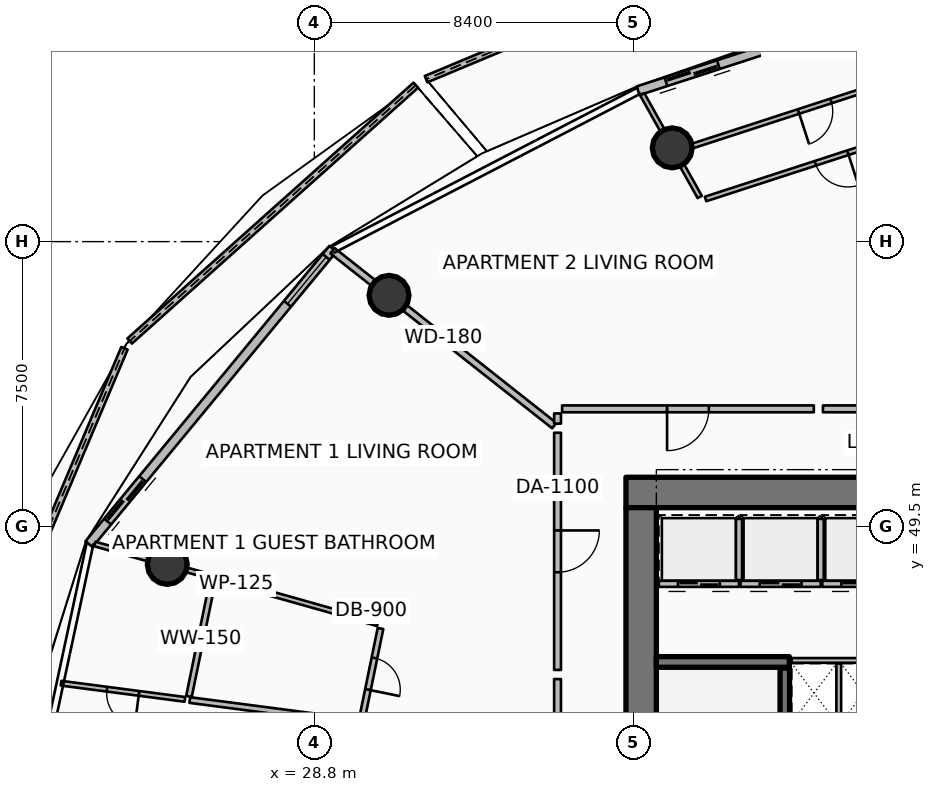
"""IFC4 building model, lengths in metres.
Left out: names, types, materials, properties, quantities, classifications, styles, units other than length and angle.
Written with IfcOpenShell. Run it as: python <this file> out.ifc"""

import sys

from ifc_helpers import new_model, si_unit, direction, frame, frame_2d, origin, origin_2d, place, context, subcontext, project, spatial, polyline, rectangle, circle, outline, extrude, element, fill, save


model = new_model("IFC4")
c1 = context("Model", 3, precision=1e-05, world=origin(), true_north=direction((0.0, 1.0)))
c2 = subcontext(c1, "Body", "Model", "MODEL_VIEW")
j1 = project(units=[si_unit("LENGTHUNIT", "METRE"), si_unit("PLANEANGLEUNIT", "RADIAN")], contexts=[c1])
p1 = place(None, origin())
s1 = spatial("IfcSite", under=j1, at=p1, CompositionType="ELEMENT")
p2 = place(p1, origin())
s2 = spatial("IfcBuilding", under=s1, at=p2, CompositionType="ELEMENT")
p3 = place(p2, frame((0.0, 0.0, 150.3)))
s3 = spatial("IfcBuildingStorey", under=s2, at=p3, CompositionType="ELEMENT", Elevation=150.3)
p4 = place(p3, frame((37.0, 50.4, 0.0), z_axis=(0.0, 0.0, 1.0), x_axis=(1.0, 0.0, 0.0)))
e1 = element("IfcWall", 1, at=p4, inside=s3, PredefinedType="SHEAR", context=c2, shape_type="SweptSolid", body=[
    extrude(rectangle(XDim=9.9, YDim=0.8, at=frame_2d((4.95, 0.0))), origin(), (0.0, 0.0, 1.0), 3.75),
])
p5 = place(p3, frame((37.4, 34.0, 0.0), z_axis=(0.0, 0.0, 1.0), x_axis=(0.0, 1.0, 0.0)))
e2 = element("IfcWall", 2, at=p5, inside=s3, PredefinedType="SHEAR", context=c2, shape_type="SweptSolid", body=[
    extrude(rectangle(XDim=16.0, YDim=0.8, at=frame_2d((8.0, 0.0))), origin(), (0.0, 0.0, 1.0), 3.75),
])
p6 = place(p3, frame((37.8, 45.94, 0.0), z_axis=(0.0, 0.0, 1.0), x_axis=(1.0, 0.0, 0.0)))
e3 = element("IfcWall", 3, at=p6, inside=s3, PredefinedType="SHEAR", context=c2, shape_type="SweptSolid", body=[
    extrude(rectangle(XDim=3.5, YDim=0.28, at=frame_2d((1.75, 0.0))), origin(), (0.0, 0.0, 1.0), 3.75),
])
for number, where, z_axis, x_axis in (
    (4, (38.218, 59.467, 0.0), (0.0, 0.0, 1.0), (1.0, 0.0, 0.0)),
    (5, (30.766, 55.586, 0.0), (0.0, 0.0, 1.0), (1.0, 0.0, 0.0)),
    (6, (24.93, 48.506, 0.0), (0.0, 0.0, 1.0), (1.0, 0.0, 0.0)),
):
    element("IfcColumn", number, at=place(p3, frame(where, z_axis=z_axis, x_axis=x_axis)), inside=s3, PredefinedType="COLUMN", context=c2, shape_type="SweptSolid", body=[
        extrude(circle(Radius=0.525, at=origin_2d()), origin(), (0.0, 0.0, 1.0), 3.5),
    ])
p7 = place(p3, frame((40.433, 64.901, 0.0), z_axis=(0.0, 0.0, 1.0), x_axis=(-0.922918869306, -0.384994494349, 0.0)))
e7 = element("IfcWall", 7, at=p7, inside=s3, PredefinedType="PARAPET", context=c2, shape_type="SweptSolid", body=[
    extrude(outline(polyline([(0.0, 0.0), (9.419, 0.0), (9.419, 1.756), (4.709, 1.853), (0.0, 1.832), (0.0, 0.0)])), frame((0.0, 0.09, 0.0), z_axis=(0.0, -1.0, 0.0), x_axis=(1.0, 0.0, 0.0)), (0.0, 0.0, 1.0), 0.18),
])
p8 = place(p3, frame((31.47, 61.116, 0.0), z_axis=(0.0, 0.0, 1.0), x_axis=(-0.745533944851, -0.666467656435, 0.0)))
e8 = element("IfcWall", 8, at=p8, inside=s3, PredefinedType="PARAPET", context=c2, shape_type="SweptSolid", body=[
    extrude(outline(polyline([(0.0, 0.0), (10.1, 0.0), (10.1, 1.348), (5.05, 1.562), (0.0, 1.747), (0.0, 0.0)])), frame((0.0, 0.09, 0.0), z_axis=(0.0, -1.0, 0.0), x_axis=(1.0, 0.0, 0.0)), (0.0, 0.0, 1.0), 0.18),
])
p9 = place(p3, frame((23.804, 54.194, 0.0), z_axis=(0.0, 0.0, 1.0), x_axis=(-0.388680391431, -0.921372646282, 0.0)))
e9 = element("IfcWall", 9, at=p9, inside=s3, PredefinedType="PARAPET", context=c2, shape_type="SweptSolid", body=[
    extrude(outline(polyline([(0.0, 0.0), (10.626, 0.0), (10.626, 1.12), (5.313, 1.182), (0.0, 1.348), (0.0, 0.0)])), frame((0.0, 0.09, 0.0), z_axis=(0.0, -1.0, 0.0), x_axis=(1.0, 0.0, 0.0)), (0.0, 0.0, 1.0), 0.18),
])
p10 = place(p3, frame((45.49, 63.624, 0.0), z_axis=(0.0, 0.0, 1.0), x_axis=(-0.951046390632, -0.309048156224, 0.0)))
e10 = element("IfcWall", 10, at=p10, inside=s3, PredefinedType="SOLIDWALL", context=c2, shape_type="SweptSolid", body=[
    extrude(rectangle(XDim=8.59, YDim=0.24, at=frame_2d((4.295, 0.0))), origin(), (0.0, 0.0, 1.0), 2.45),
])
p11 = place(p10, frame((6.37, 0.0, 0.0)))
e11 = element("IfcOpeningElement", 11, at=p11, cuts=e10, PredefinedType="OPENING", context=c2, shape_type="SweptSolid", body=[
    extrude(rectangle(XDim=1.45, YDim=2.15, at=frame_2d((0.725, 1.075))), frame((0.0, 0.13, 0.0), z_axis=(0.0, -1.0, 0.0), x_axis=(1.0, 0.0, 0.0)), (0.0, 0.0, 1.0), 0.26),
])
p12 = place(p10, frame((0.28, 0.0, 0.65)))
e12 = element("IfcOpeningElement", 12, at=p12, cuts=e10, PredefinedType="OPENING", context=c2, shape_type="SweptSolid", body=[
    extrude(rectangle(XDim=1.6, YDim=1.5, at=frame_2d((0.8, 0.75))), frame((0.0, 0.13, 0.0), z_axis=(0.0, -1.0, 0.0), x_axis=(1.0, 0.0, 0.0)), (0.0, 0.0, 1.0), 0.26),
])
p13 = place(p3, frame((29.291, 56.813, 0.0), z_axis=(0.0, 0.0, 1.0), x_axis=(-0.636771922292, -0.77105221547, 0.0)))
e13 = element("IfcWall", 13, at=p13, inside=s3, PredefinedType="SOLIDWALL", context=c2, shape_type="SweptSolid", body=[
    extrude(rectangle(XDim=10.082, YDim=0.24, at=frame_2d((5.041, 0.0))), origin(), (0.0, 0.0, 1.0), 2.45),
])
p14 = place(p13, frame((7.862, 0.0, 0.0)))
e14 = element("IfcOpeningElement", 14, at=p14, cuts=e13, PredefinedType="OPENING", context=c2, shape_type="SweptSolid", body=[
    extrude(rectangle(XDim=1.45, YDim=2.15, at=frame_2d((0.725, 1.075))), frame((0.0, 0.13, 0.0), z_axis=(0.0, -1.0, 0.0), x_axis=(1.0, 0.0, 0.0)), (0.0, 0.0, 1.0), 0.26),
])
p15 = place(p13, frame((0.28, 0.0, 0.65)))
e15 = element("IfcOpeningElement", 15, at=p15, cuts=e13, PredefinedType="OPENING", context=c2, shape_type="SweptSolid", body=[
    extrude(rectangle(XDim=1.6, YDim=1.5, at=frame_2d((0.8, 0.75))), frame((0.0, 0.13, 0.0), z_axis=(0.0, -1.0, 0.0), x_axis=(1.0, 0.0, 0.0)), (0.0, 0.0, 1.0), 0.26),
])
p16 = place(p3, frame((41.18, 38.22, 0.0), z_axis=(0.0, 0.0, 1.0), x_axis=(0.0, 1.0, 0.0)))
e16 = element("IfcWall", 16, at=p16, inside=s3, PredefinedType="SOLIDWALL", context=c2, shape_type="SweptSolid", body=[
    extrude(rectangle(XDim=7.56, YDim=0.25, at=frame_2d((3.78, 0.0))), origin(), (0.0, 0.0, 1.0), 3.5),
])
p17 = place(p16, frame((0.3, 0.0, 0.0)))
e17 = element("IfcOpeningElement", 17, at=p17, cuts=e16, PredefinedType="OPENING", context=c2, shape_type="SweptSolid", body=[
    extrude(rectangle(XDim=1.55, YDim=2.15, at=frame_2d((0.775, 1.075))), frame((0.0, 0.135, 0.0), z_axis=(0.0, -1.0, 0.0), x_axis=(1.0, 0.0, 0.0)), (0.0, 0.0, 1.0), 0.27),
])
p18 = place(p3, frame((39.975, 47.995, 0.0), z_axis=(0.0, 0.0, 1.0), x_axis=(-1.0, 0.0, 0.0)))
e18 = element("IfcWall", 18, at=p18, inside=s3, PredefinedType="PARTITIONING", context=c2, shape_type="SweptSolid", body=[
    extrude(rectangle(XDim=2.11, YDim=0.16, at=frame_2d((1.055, 0.0))), origin(), (0.0, 0.0, 1.0), 3.5),
])
p19 = place(p18, frame((0.505, 0.0, 0.0)))
e19 = element("IfcOpeningElement", 19, at=p19, cuts=e18, PredefinedType="OPENING", context=c2, shape_type="SweptSolid", body=[
    extrude(rectangle(XDim=1.1, YDim=2.1, at=frame_2d((0.55, 1.05))), frame((0.0, 0.09, 0.0), z_axis=(0.0, -1.0, 0.0), x_axis=(1.0, 0.0, 0.0)), (0.0, 0.0, 1.0), 0.18),
])
p20 = place(p3, frame((39.975, 48.095, 0.0), z_axis=(0.0, 0.0, 1.0), x_axis=(0.0, 1.0, 0.0)))
e20 = element("IfcWall", 20, at=p20, inside=s3, PredefinedType="PARTITIONING", context=c2, shape_type="SweptSolid", body=[
    extrude(rectangle(XDim=1.61, YDim=0.16, at=frame_2d((0.805, 0.0))), origin(), (0.0, 0.0, 1.0), 3.5),
])
p21 = place(p3, frame((42.125, 47.995, 0.0), z_axis=(0.0, 0.0, 1.0), x_axis=(-1.0, 0.0, 0.0)))
e21 = element("IfcWall", 21, at=p21, inside=s3, PredefinedType="PARTITIONING", context=c2, shape_type="SweptSolid", body=[
    extrude(rectangle(XDim=2.11, YDim=0.16, at=frame_2d((1.055, 0.0))), origin(), (0.0, 0.0, 1.0), 3.5),
])
p22 = place(p21, frame((0.505, 0.0, 0.0)))
e22 = element("IfcOpeningElement", 22, at=p22, cuts=e21, PredefinedType="OPENING", context=c2, shape_type="SweptSolid", body=[
    extrude(rectangle(XDim=1.1, YDim=2.1, at=frame_2d((0.55, 1.05))), frame((0.0, 0.09, 0.0), z_axis=(0.0, -1.0, 0.0), x_axis=(1.0, 0.0, 0.0)), (0.0, 0.0, 1.0), 0.18),
])
p23 = place(p3, frame((42.125, 48.095, 0.0), z_axis=(0.0, 0.0, 1.0), x_axis=(0.0, 1.0, 0.0)))
e23 = element("IfcWall", 23, at=p23, inside=s3, PredefinedType="PARTITIONING", context=c2, shape_type="SweptSolid", body=[
    extrude(rectangle(XDim=1.61, YDim=0.16, at=frame_2d((0.805, 0.0))), origin(), (0.0, 0.0, 1.0), 3.5),
])
p24 = place(p3, frame((44.275, 47.995, 0.0), z_axis=(0.0, 0.0, 1.0), x_axis=(-1.0, 0.0, 0.0)))
e24 = element("IfcWall", 24, at=p24, inside=s3, PredefinedType="PARTITIONING", context=c2, shape_type="SweptSolid", body=[
    extrude(rectangle(XDim=2.11, YDim=0.16, at=frame_2d((1.055, 0.0))), origin(), (0.0, 0.0, 1.0), 3.5),
])
p25 = place(p24, frame((0.505, 0.0, 0.0)))
e25 = element("IfcOpeningElement", 25, at=p25, cuts=e24, PredefinedType="OPENING", context=c2, shape_type="SweptSolid", body=[
    extrude(rectangle(XDim=1.1, YDim=2.1, at=frame_2d((0.55, 1.05))), frame((0.0, 0.09, 0.0), z_axis=(0.0, -1.0, 0.0), x_axis=(1.0, 0.0, 0.0)), (0.0, 0.0, 1.0), 0.18),
])
p26 = place(p3, frame((41.36, 45.98, 0.0), z_axis=(0.0, 0.0, 1.0), x_axis=(1.0, 0.0, 0.0)))
e26 = element("IfcWall", 26, at=p26, inside=s3, PredefinedType="PARTITIONING", context=c2, shape_type="SweptSolid", body=[
    extrude(rectangle(XDim=5.36, YDim=0.125, at=frame_2d((2.68, 0.0))), origin(), (0.0, 0.0, 1.0), 2.94),
])
p27 = place(p3, frame((42.6, 44.35, 0.0), z_axis=(0.0, 0.0, 1.0), x_axis=(0.0, 1.0, 0.0)))
e27 = element("IfcWall", 27, at=p27, inside=s3, PredefinedType="PARTITIONING", context=c2, shape_type="SweptSolid", body=[
    extrude(rectangle(XDim=1.55, YDim=0.125, at=frame_2d((0.775, 0.0))), origin(), (0.0, 0.0, 1.0), 2.94),
])
p28 = place(p3, frame((35.114, 52.159, 0.0), z_axis=(0.0, 0.0, 1.0), x_axis=(-0.78531739611, 0.619093359169, 0.0)))
e28 = element("IfcWall", 28, at=p28, inside=s3, PredefinedType="PARTITIONING", context=c2, shape_type="SweptSolid", body=[
    extrude(rectangle(XDim=7.43, YDim=0.18, at=frame_2d((3.715, 0.0))), origin(), (0.0, 0.0, 1.0), 2.94),
])
p29 = place(p3, frame((35.2, 51.971, 0.0), z_axis=(0.0, 0.0, 1.0), x_axis=(0.0, -1.0, 0.0)))
e29 = element("IfcWall", 29, at=p29, inside=s3, PredefinedType="PARTITIONING", context=c2, shape_type="SweptSolid", body=[
    extrude(rectangle(XDim=6.241, YDim=0.18, at=frame_2d((3.12, 0.0))), origin(), (0.0, 0.0, 1.0), 2.94),
])
p30 = place(p29, frame((2.57, 0.0, 0.0)))
e30 = element("IfcOpeningElement", 30, at=p30, cuts=e29, PredefinedType="OPENING", context=c2, shape_type="SweptSolid", body=[
    extrude(rectangle(XDim=1.1, YDim=2.1, at=frame_2d((0.55, 1.05))), frame((0.0, 0.1, 0.0), z_axis=(0.0, -1.0, 0.0), x_axis=(1.0, 0.0, 0.0)), (0.0, 0.0, 1.0), 0.2),
])
p31 = place(p3, frame((35.2, 45.49, 0.0), z_axis=(0.0, 0.0, 1.0), x_axis=(0.0, -1.0, 0.0)))
e31 = element("IfcWall", 31, at=p31, inside=s3, PredefinedType="PARTITIONING", context=c2, shape_type="SweptSolid", body=[
    extrude(rectangle(XDim=4.885, YDim=0.18, at=frame_2d((2.442, 0.0))), origin(), (0.0, 0.0, 1.0), 2.94),
])
p32 = place(p3, frame((30.465, 46.945, 0.0), z_axis=(0.0, 0.0, 1.0), x_axis=(-0.962456021196, 0.271437667363, 0.0)))
e32 = element("IfcWall", 32, at=p32, inside=s3, PredefinedType="PARTITIONING", context=c2, shape_type="SweptSolid", body=[
    extrude(rectangle(XDim=7.732, YDim=0.125, at=frame_2d((3.866, 0.0))), origin(), (0.0, 0.0, 1.0), 2.94),
])
p33 = place(p3, frame((30.541, 46.82, 0.0), z_axis=(0.0, 0.0, 1.0), x_axis=(-0.201072520907, -0.979576358094, 0.0)))
e33 = element("IfcWall", 33, at=p33, inside=s3, PredefinedType="PARTITIONING", context=c2, shape_type="SweptSolid", body=[
    extrude(rectangle(XDim=2.433, YDim=0.15, at=frame_2d((1.217, 0.0))), origin(), (0.0, 0.0, 1.0), 2.94),
])
p34 = place(p33, frame((0.792, 0.0, 0.0)))
e34 = element("IfcOpeningElement", 34, at=p34, cuts=e33, PredefinedType="OPENING", context=c2, shape_type="SweptSolid", body=[
    extrude(rectangle(XDim=0.85, YDim=2.06, at=frame_2d((0.425, 1.03))), frame((0.0, 0.085, 0.0), z_axis=(0.0, -1.0, 0.0), x_axis=(1.0, 0.0, 0.0)), (0.0, 0.0, 1.0), 0.17),
])
p35 = place(p3, frame((26.124, 48.066, 0.0), z_axis=(0.0, 0.0, 1.0), x_axis=(-0.201054681034, -0.979580019822, 0.0)))
e35 = element("IfcWall", 35, at=p35, inside=s3, PredefinedType="PARTITIONING", context=c2, shape_type="SweptSolid", body=[
    extrude(rectangle(XDim=3.098, YDim=0.15, at=frame_2d((1.549, 0.0))), origin(), (0.0, 0.0, 1.0), 2.94),
])
p36 = place(p3, frame((29.945, 44.36, 0.0), z_axis=(0.0, 0.0, 1.0), x_axis=(-0.991563130501, 0.129624682181, 0.0)))
e36 = element("IfcWall", 36, at=p36, inside=s3, PredefinedType="PARTITIONING", context=c2, shape_type="SweptSolid", body=[
    extrude(rectangle(XDim=4.46, YDim=0.15, at=frame_2d((2.23, 0.0))), origin(), (0.0, 0.0, 1.0), 2.94),
])
p37 = place(p3, frame((25.393, 44.955, 0.0), z_axis=(0.0, 0.0, 1.0), x_axis=(-0.991560176963, 0.12964727325, 0.0)))
e37 = element("IfcWall", 37, at=p37, inside=s3, PredefinedType="PARTITIONING", context=c2, shape_type="SweptSolid", body=[
    extrude(rectangle(XDim=3.286, YDim=0.125, at=frame_2d((1.643, 0.0))), origin(), (0.0, 0.0, 1.0), 2.94),
])
p38 = place(p37, frame((1.218, 0.0, 0.0)))
e38 = element("IfcOpeningElement", 38, at=p38, cuts=e37, PredefinedType="OPENING", context=c2, shape_type="SweptSolid", body=[
    extrude(rectangle(XDim=0.85, YDim=2.06, at=frame_2d((0.425, 1.03))), frame((0.0, 0.073, 0.0), z_axis=(0.0, -1.0, 0.0), x_axis=(1.0, 0.0, 0.0)), (0.0, 0.0, 1.0), 0.145),
])
p39 = place(p3, frame((41.944, 52.6, 0.0), z_axis=(0.0, 0.0, 1.0), x_axis=(-1.0, 0.0, 0.0)))
e39 = element("IfcWall", 39, at=p39, inside=s3, PredefinedType="PARTITIONING", context=c2, shape_type="SweptSolid", body=[
    extrude(rectangle(XDim=6.624, YDim=0.18, at=frame_2d((3.312, 0.0))), origin(), (0.0, 0.0, 1.0), 2.94),
])
p40 = place(p39, frame((2.762, 0.0, 0.0)))
e40 = element("IfcOpeningElement", 40, at=p40, cuts=e39, PredefinedType="OPENING", context=c2, shape_type="SweptSolid", body=[
    extrude(rectangle(XDim=1.1, YDim=2.1, at=frame_2d((0.55, 1.05))), frame((0.0, 0.1, 0.0), z_axis=(0.0, -1.0, 0.0), x_axis=(1.0, 0.0, 0.0)), (0.0, 0.0, 1.0), 0.2),
])
p41 = place(p3, frame((35.2, 52.48, 0.0), z_axis=(0.0, 0.0, 1.0), x_axis=(0.0, -1.0, 0.0)))
e41 = element("IfcWall", 41, at=p41, inside=s3, PredefinedType="PARTITIONING", context=c2, shape_type="SweptSolid", body=[
    extrude(rectangle(XDim=0.269, YDim=0.18, at=frame_2d((0.135, 0.0))), origin(), (0.0, 0.0, 1.0), 2.94),
])
p42 = place(p3, frame((46.625, 52.6, 0.0), z_axis=(0.0, 0.0, 1.0), x_axis=(-1.0, 0.0, 0.0)))
e42 = element("IfcWall", 42, at=p42, inside=s3, PredefinedType="PARTITIONING", context=c2, shape_type="SweptSolid", body=[
    extrude(rectangle(XDim=4.442, YDim=0.18, at=frame_2d((2.221, 0.0))), origin(), (0.0, 0.0, 1.0), 2.94),
])
p43 = place(p3, frame((38.941, 58.175, 0.0), z_axis=(0.0, 0.0, 1.0), x_axis=(-0.488620181058, 0.872496600946, 0.0)))
e43 = element("IfcWall", 43, at=p43, inside=s3, PredefinedType="PARTITIONING", context=c2, shape_type="SweptSolid", body=[
    extrude(rectangle(XDim=3.095, YDim=0.125, at=frame_2d((1.548, 0.0))), origin(), (0.0, 0.0, 1.0), 2.94),
])
p44 = place(p3, frame((45.728, 60.277, 0.0), z_axis=(0.0, 0.0, 1.0), x_axis=(-0.951064162215, -0.308993461661, 0.0)))
e44 = element("IfcWall", 44, at=p44, inside=s3, PredefinedType="PARTITIONING", context=c2, shape_type="SweptSolid", body=[
    extrude(rectangle(XDim=6.974, YDim=0.125, at=frame_2d((3.487, 0.0))), origin(), (0.0, 0.0, 1.0), 2.94),
])
p45 = place(p44, frame((3.037, 0.0, 0.0)))
e45 = element("IfcOpeningElement", 45, at=p45, cuts=e44, PredefinedType="OPENING", context=c2, shape_type="SweptSolid", body=[
    extrude(rectangle(XDim=0.9, YDim=2.08, at=frame_2d((0.45, 1.04))), frame((0.0, 0.073, 0.0), z_axis=(0.0, -1.0, 0.0), x_axis=(1.0, 0.0, 0.0)), (0.0, 0.0, 1.0), 0.145),
])
p46 = place(p3, frame((45.556, 61.728, 0.0), z_axis=(0.0, 0.0, 1.0), x_axis=(-0.951060224054, -0.309005582834, 0.0)))
e46 = element("IfcWall", 46, at=p46, inside=s3, PredefinedType="PARTITIONING", context=c2, shape_type="SweptSolid", body=[
    extrude(rectangle(XDim=7.544, YDim=0.125, at=frame_2d((3.772, 0.0))), origin(), (0.0, 0.0, 1.0), 2.94),
])
p47 = place(p46, frame((3.322, 0.0, 0.0)))
e47 = element("IfcOpeningElement", 47, at=p47, cuts=e46, PredefinedType="OPENING", context=c2, shape_type="SweptSolid", body=[
    extrude(rectangle(XDim=0.9, YDim=2.08, at=frame_2d((0.45, 1.04))), frame((0.0, 0.073, 0.0), z_axis=(0.0, -1.0, 0.0), x_axis=(1.0, 0.0, 0.0)), (0.0, 0.0, 1.0), 0.145),
])
p48 = place(p11, origin())
e48 = element("IfcDoor", 48, at=p48, inside=s3, OperationType="DOUBLE_DOOR_SLIDING", PredefinedType="DOOR", context=c2, shape_type="SweptSolid", body=[
    extrude(rectangle(XDim=1.45, YDim=2.15, at=frame_2d((0.725, 1.075))), frame((0.0, 0.025, 0.0), z_axis=(0.0, -1.0, 0.0), x_axis=(1.0, 0.0, 0.0)), (0.0, 0.0, 1.0), 0.05),
])
fill(e11, e48)
p49 = place(p14, origin())
e49 = element("IfcDoor", 49, at=p49, inside=s3, OperationType="DOUBLE_DOOR_SLIDING", PredefinedType="DOOR", context=c2, shape_type="SweptSolid", body=[
    extrude(rectangle(XDim=1.45, YDim=2.15, at=frame_2d((0.725, 1.075))), frame((0.0, 0.025, 0.0), z_axis=(0.0, -1.0, 0.0), x_axis=(1.0, 0.0, 0.0)), (0.0, 0.0, 1.0), 0.05),
])
fill(e14, e49)
p50 = place(p15, origin())
e50 = element("IfcWindow", 50, at=p50, inside=s3, PartitioningType="SINGLE_PANEL", PredefinedType="WINDOW", context=c2, shape_type="SweptSolid", body=[
    extrude(rectangle(XDim=1.6, YDim=1.5, at=frame_2d((0.8, 0.75))), frame((0.0, 0.03, 0.0), z_axis=(0.0, -1.0, 0.0), x_axis=(1.0, 0.0, 0.0)), (0.0, 0.0, 1.0), 0.06),
])
fill(e15, e50)
p51 = place(p19, origin())
e51 = element("IfcDoor", 51, at=p51, inside=s3, OperationType="DOUBLE_DOOR_SLIDING", PredefinedType="DOOR", context=c2, shape_type="SweptSolid", body=[
    extrude(rectangle(XDim=1.1, YDim=2.1, at=frame_2d((0.55, 1.05))), frame((0.0, 0.025, 0.0), z_axis=(0.0, -1.0, 0.0), x_axis=(1.0, 0.0, 0.0)), (0.0, 0.0, 1.0), 0.05),
])
fill(e19, e51)
p52 = place(p22, origin())
e52 = element("IfcDoor", 52, at=p52, inside=s3, OperationType="DOUBLE_DOOR_SLIDING", PredefinedType="DOOR", context=c2, shape_type="SweptSolid", body=[
    extrude(rectangle(XDim=1.1, YDim=2.1, at=frame_2d((0.55, 1.05))), frame((0.0, 0.025, 0.0), z_axis=(0.0, -1.0, 0.0), x_axis=(1.0, 0.0, 0.0)), (0.0, 0.0, 1.0), 0.05),
])
fill(e22, e52)
p53 = place(p25, origin())
e53 = element("IfcDoor", 53, at=p53, inside=s3, OperationType="DOUBLE_DOOR_SLIDING", PredefinedType="DOOR", context=c2, shape_type="SweptSolid", body=[
    extrude(rectangle(XDim=1.1, YDim=2.1, at=frame_2d((0.55, 1.05))), frame((0.0, 0.025, 0.0), z_axis=(0.0, -1.0, 0.0), x_axis=(1.0, 0.0, 0.0)), (0.0, 0.0, 1.0), 0.05),
])
fill(e25, e53)
p54 = place(p30, origin())
e54 = element("IfcDoor", 54, at=p54, inside=s3, OperationType="SINGLE_SWING_LEFT", PredefinedType="DOOR", context=c2, shape_type="SweptSolid", body=[
    extrude(rectangle(XDim=1.1, YDim=2.1, at=frame_2d((0.55, 1.05))), frame((0.0, 0.025, 0.0), z_axis=(0.0, -1.0, 0.0), x_axis=(1.0, 0.0, 0.0)), (0.0, 0.0, 1.0), 0.05),
])
fill(e30, e54)
p55 = place(p34, origin())
e55 = element("IfcDoor", 55, at=p55, inside=s3, OperationType="SINGLE_SWING_RIGHT", PredefinedType="DOOR", context=c2, shape_type="SweptSolid", body=[
    extrude(rectangle(XDim=0.85, YDim=2.06, at=frame_2d((0.425, 1.03))), frame((0.0, 0.025, 0.0), z_axis=(0.0, -1.0, 0.0), x_axis=(1.0, 0.0, 0.0)), (0.0, 0.0, 1.0), 0.05),
])
fill(e34, e55)
p56 = place(p38, origin())
e56 = element("IfcDoor", 56, at=p56, inside=s3, OperationType="SINGLE_SWING_LEFT", PredefinedType="DOOR", context=c2, shape_type="SweptSolid", body=[
    extrude(rectangle(XDim=0.85, YDim=2.06, at=frame_2d((0.425, 1.03))), frame((0.0, 0.025, 0.0), z_axis=(0.0, -1.0, 0.0), x_axis=(1.0, 0.0, 0.0)), (0.0, 0.0, 1.0), 0.05),
])
fill(e38, e56)
p57 = place(p40, origin())
e57 = element("IfcDoor", 57, at=p57, inside=s3, OperationType="SINGLE_SWING_RIGHT", PredefinedType="DOOR", context=c2, shape_type="SweptSolid", body=[
    extrude(rectangle(XDim=1.1, YDim=2.1, at=frame_2d((0.55, 1.05))), frame((0.0, 0.025, 0.0), z_axis=(0.0, -1.0, 0.0), x_axis=(1.0, 0.0, 0.0)), (0.0, 0.0, 1.0), 0.05),
])
fill(e40, e57)
p58 = place(p45, origin())
e58 = element("IfcDoor", 58, at=p58, inside=s3, OperationType="SINGLE_SWING_LEFT", PredefinedType="DOOR", context=c2, shape_type="SweptSolid", body=[
    extrude(rectangle(XDim=0.9, YDim=2.08, at=frame_2d((0.45, 1.04))), frame((0.0, 0.025, 0.0), z_axis=(0.0, -1.0, 0.0), x_axis=(1.0, 0.0, 0.0)), (0.0, 0.0, 1.0), 0.05),
])
fill(e45, e58)
p59 = place(p47, origin())
e59 = element("IfcDoor", 59, at=p59, inside=s3, OperationType="SINGLE_SWING_RIGHT", PredefinedType="DOOR", context=c2, shape_type="SweptSolid", body=[
    extrude(rectangle(XDim=0.9, YDim=2.08, at=frame_2d((0.45, 1.04))), frame((0.0, 0.025, 0.0), z_axis=(0.0, -1.0, 0.0), x_axis=(1.0, 0.0, 0.0)), (0.0, 0.0, 1.0), 0.05),
])
fill(e47, e59)
save(model, sys.argv[1])
